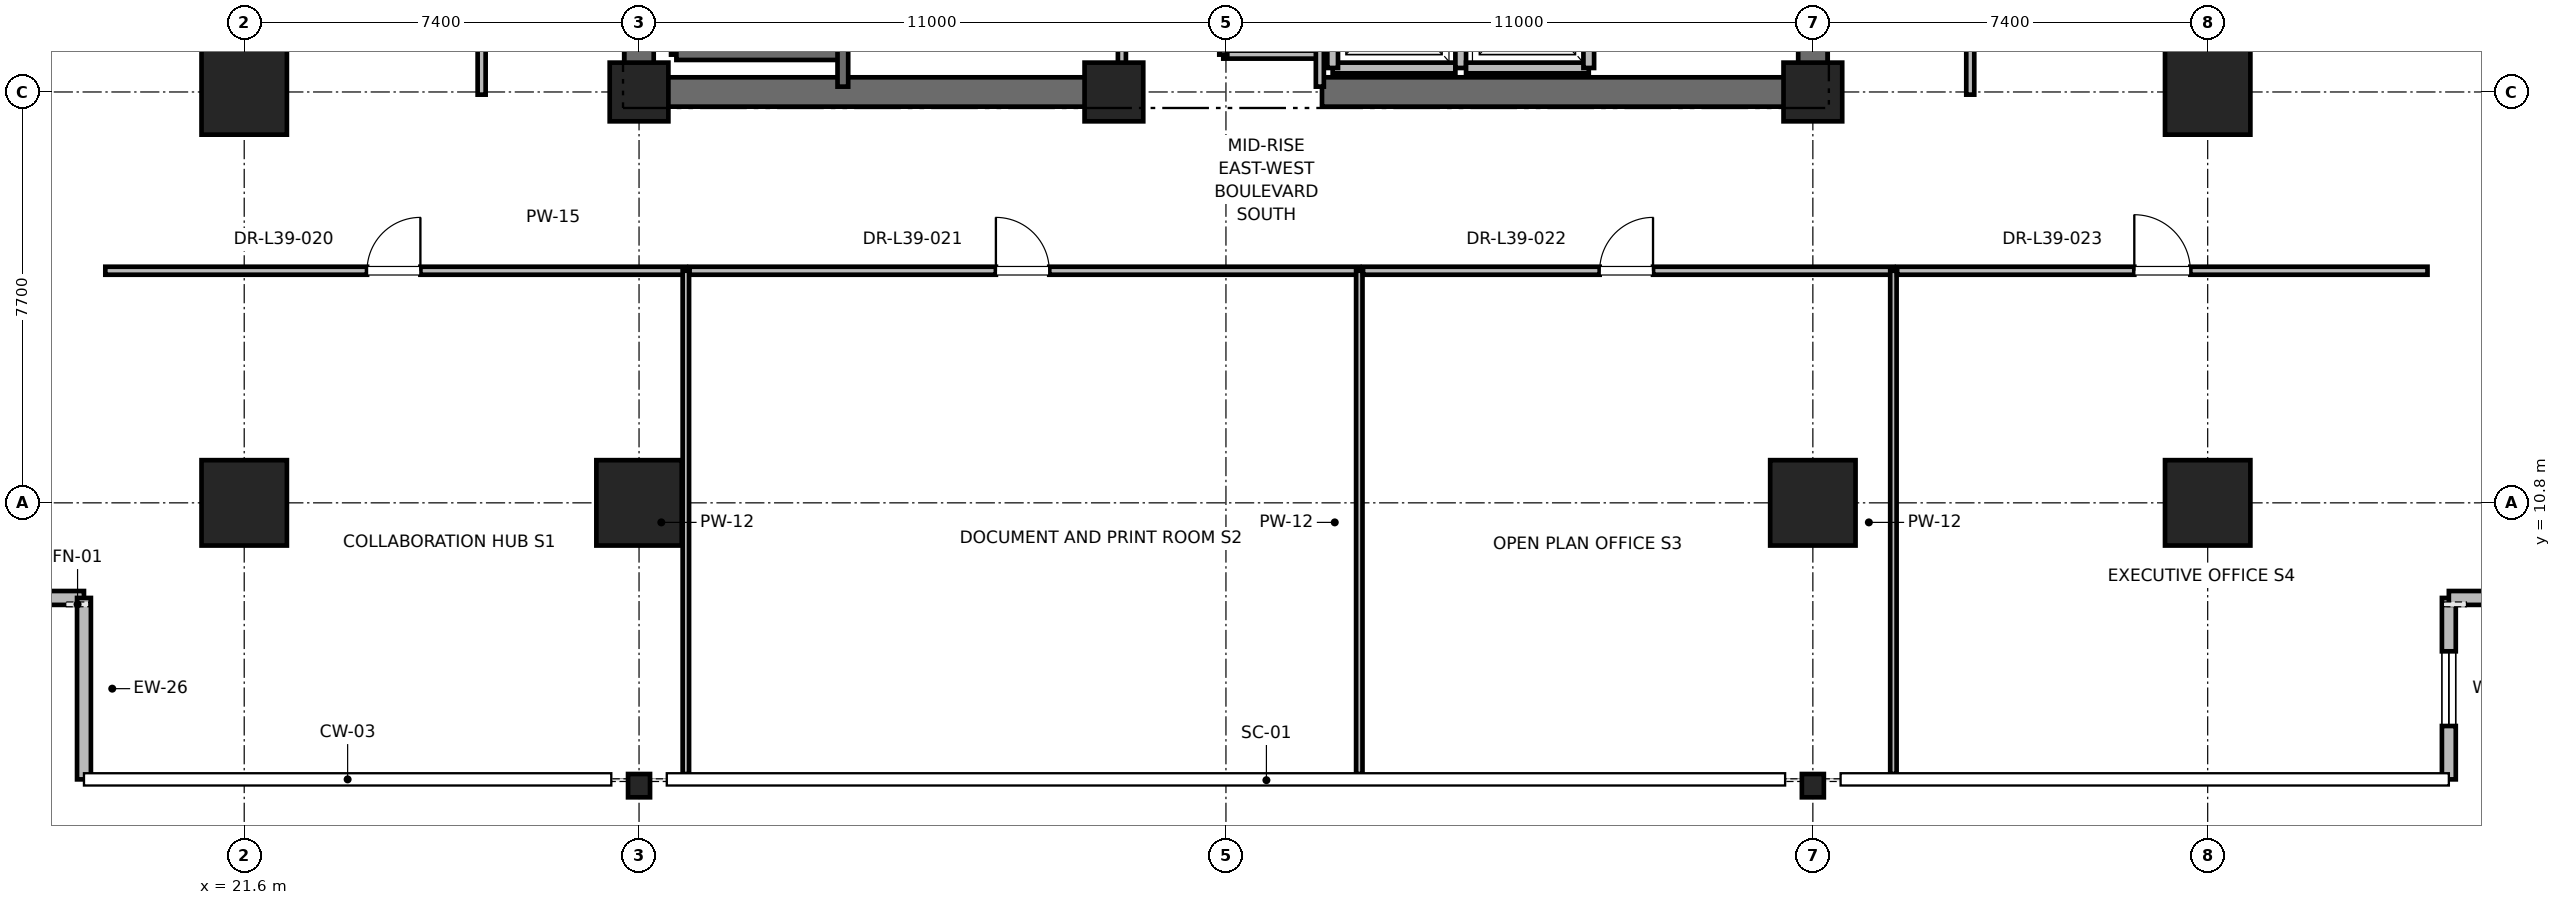
"""IFC4 building model, lengths in metres.
Left out: names, types, materials, properties, quantities, classifications, styles, units other than length and angle.
Written with IfcOpenShell. Run it as: python <this file> out.ifc"""

import sys

from ifc_helpers import new_model, si_unit, direction, frame, frame_2d, origin, origin_2d, place, context, subcontext, project, spatial, rectangle, i_section, extrude, element, fill, save


model = new_model("IFC4")
c1 = context("Model", 3, precision=1e-05, world=origin(), true_north=direction((0.0, 1.0)))
c2 = subcontext(c1, "Body", "Model", "MODEL_VIEW")
j1 = project(units=[si_unit("LENGTHUNIT", "METRE"), si_unit("PLANEANGLEUNIT", "RADIAN")], contexts=[c1])
p1 = place(None, origin())
s1 = spatial("IfcSite", under=j1, at=p1, CompositionType="ELEMENT")
p2 = place(p1, origin())
s2 = spatial("IfcBuilding", under=s1, at=p2, CompositionType="ELEMENT")
p3 = place(p2, frame((0.0, 0.0, 168.4)))
s3 = spatial("IfcBuildingStorey", under=s2, at=p3, CompositionType="ELEMENT", Elevation=168.4)
for number, where, z_axis, x_axis in (
    (1, (29.0, 10.8, 0.0), (0.0, 0.0, 1.0), (1.0, 0.0, 0.0)),
    (2, (51.0, 10.8, 0.0), (0.0, 0.0, 1.0), (1.0, 0.0, 0.0)),
    (3, (21.6, 18.5, 0.0), (0.0, 0.0, 1.0), (1.0, 0.0, 0.0)),
    (4, (58.4, 18.5, 0.0), (0.0, 0.0, 1.0), (1.0, 0.0, 0.0)),
    (5, (21.6, 10.8, 0.0), (0.0, 0.0, 1.0), (1.0, 0.0, 0.0)),
    (6, (58.4, 10.8, 0.0), (0.0, 0.0, 1.0), (1.0, 0.0, 0.0)),
):
    element("IfcColumn", number, at=place(p3, frame(where, z_axis=z_axis, x_axis=x_axis)), inside=s3, PredefinedType="COLUMN", context=c2, shape_type="SweptSolid", body=[
        extrude(rectangle(XDim=1.6, YDim=1.6, at=origin_2d()), origin(), (0.0, 0.0, 1.0), 4.0),
    ])
for number, where, z_axis, x_axis in (
    (7, (29.0, 5.5, 0.0), (0.0, 0.0, 1.0), (1.0, 0.0, 0.0)),
    (8, (51.0, 5.5, 0.0), (0.0, 0.0, 1.0), (1.0, 0.0, 0.0)),
):
    element("IfcColumn", number, at=place(p3, frame(where, z_axis=z_axis, x_axis=x_axis)), inside=s3, PredefinedType="COLUMN", context=c2, shape_type="SweptSolid", body=[
        extrude(i_section(OverallWidth=0.412, OverallDepth=0.437, WebThickness=0.036, FlangeThickness=0.058, FilletRadius=0.015, at=origin_2d()), origin(), (0.0, 0.0, 1.0), 4.0),
    ])
for number, where, z_axis, x_axis in (
    (9, (29.0, 18.5, 0.0), (0.0, 0.0, 1.0), (1.0, 0.0, 0.0)),
    (10, (51.0, 18.5, 0.0), (0.0, 0.0, 1.0), (1.0, 0.0, 0.0)),
    (11, (37.9, 18.5, 0.0), (0.0, 0.0, 1.0), (1.0, 0.0, 0.0)),
):
    element("IfcColumn", number, at=place(p3, frame(where, z_axis=z_axis, x_axis=x_axis)), inside=s3, PredefinedType="PILASTER", context=c2, shape_type="SweptSolid", body=[
        extrude(rectangle(XDim=1.1, YDim=1.1, at=origin_2d()), origin(), (0.0, 0.0, 1.0), 4.0),
    ])
for number, where, z_axis, x_axis in (
    (12, (29.0, 18.5, 0.0), (0.0, 0.0, 1.0), (1.0, 0.0, 0.0)),
    (13, (41.8, 18.5, 0.0), (0.0, 0.0, 1.0), (1.0, 0.0, 0.0)),
):
    element("IfcWall", number, at=place(p3, frame(where, z_axis=z_axis, x_axis=x_axis)), inside=s3, PredefinedType="SHEAR", context=c2, shape_type="SweptSolid", body=[
        extrude(rectangle(XDim=9.2, YDim=0.55, at=frame_2d((4.6, 0.0))), origin(), (0.0, 0.0, 1.0), 3.775),
    ])
p4 = place(p3, frame((29.0, 18.5, 0.0), z_axis=(0.0, 0.0, 1.0), x_axis=(0.0, 1.0, 0.0)))
e14 = element("IfcWall", 14, at=p4, inside=s3, PredefinedType="SHEAR", context=c2, shape_type="SweptSolid", body=[
    extrude(rectangle(XDim=8.8, YDim=0.55, at=frame_2d((4.4, 0.0))), origin(), (0.0, 0.0, 1.0), 3.775),
])
p5 = place(p3, frame((51.0, 18.5, 0.0), z_axis=(0.0, 0.0, 1.0), x_axis=(0.0, 1.0, 0.0)))
e15 = element("IfcWall", 15, at=p5, inside=s3, PredefinedType="SHEAR", context=c2, shape_type="SweptSolid", body=[
    extrude(rectangle(XDim=5.8, YDim=0.55, at=frame_2d((2.9, 0.0))), origin(), (0.0, 0.0, 1.0), 3.775),
])
p6 = place(p3, frame((14.797, 9.018, 0.0), z_axis=(0.0, 0.0, 1.0), x_axis=(1.0, 0.0, 0.0)))
e16 = element("IfcWall", 16, at=p6, inside=s3, PredefinedType="PARAPET", context=c2, shape_type="SweptSolid", body=[
    extrude(rectangle(XDim=3.8, YDim=0.26, at=frame_2d((1.9, 0.0))), origin(), (0.0, 0.0, 1.0), 3.775),
])
p7 = place(p6, frame((1.2, 0.0, 0.85)))
e17 = element("IfcOpeningElement", 17, at=p7, cuts=e16, PredefinedType="OPENING", context=c2, shape_type="SweptSolid", body=[
    extrude(rectangle(XDim=1.4, YDim=2.0, at=frame_2d((0.7, 1.0))), frame((0.0, 0.13, 0.0), z_axis=(0.0, -1.0, 0.0), x_axis=(1.0, 0.0, 0.0)), (0.0, 0.0, 1.0), 0.26),
])
p8 = place(p3, frame((18.597, 9.018, 0.0), z_axis=(0.0, 0.0, 1.0), x_axis=(0.0, -1.0, 0.0)))
e18 = element("IfcWall", 18, at=p8, inside=s3, PredefinedType="PARAPET", context=c2, shape_type="SweptSolid", body=[
    extrude(rectangle(XDim=3.4, YDim=0.26, at=frame_2d((1.7, 0.0))), origin(), (0.0, 0.0, 1.0), 3.775),
])
p9 = place(p3, frame((62.92, 5.618, 0.0), z_axis=(0.0, 0.0, 1.0), x_axis=(0.0, 1.0, 0.0)))
e19 = element("IfcWall", 19, at=p9, inside=s3, PredefinedType="PARAPET", context=c2, shape_type="SweptSolid", body=[
    extrude(rectangle(XDim=3.4, YDim=0.26, at=frame_2d((1.7, 0.0))), origin(), (0.0, 0.0, 1.0), 3.775),
])
p10 = place(p9, frame((1.0, 0.0, 0.85)))
e20 = element("IfcOpeningElement", 20, at=p10, cuts=e19, PredefinedType="OPENING", context=c2, shape_type="SweptSolid", body=[
    extrude(rectangle(XDim=1.4, YDim=2.0, at=frame_2d((0.7, 1.0))), frame((0.0, 0.13, 0.0), z_axis=(0.0, -1.0, 0.0), x_axis=(1.0, 0.0, 0.0)), (0.0, 0.0, 1.0), 0.26),
])
p11 = place(p3, frame((62.92, 9.018, 0.0), z_axis=(0.0, 0.0, 1.0), x_axis=(1.0, 0.0, 0.0)))
e21 = element("IfcWall", 21, at=p11, inside=s3, PredefinedType="PARAPET", context=c2, shape_type="SweptSolid", body=[
    extrude(rectangle(XDim=3.8, YDim=0.26, at=frame_2d((1.9, 0.0))), origin(), (0.0, 0.0, 1.0), 3.775),
])
p12 = place(p3, frame((29.7, 19.2, 0.0), z_axis=(0.0, 0.0, 1.0), x_axis=(0.0, 1.0, 0.0)))
e22 = element("IfcWall", 22, at=p12, inside=s3, PredefinedType="SOLIDWALL", context=c2, shape_type="SweptSolid", body=[
    extrude(rectangle(XDim=8.15, YDim=0.2, at=frame_2d((4.075, 0.0))), origin(), (0.0, 0.0, 1.0), 3.775),
])
p13 = place(p3, frame((29.7, 19.2, 0.0), z_axis=(0.0, 0.0, 1.0), x_axis=(1.0, 0.0, 0.0)))
e23 = element("IfcWall", 23, at=p13, inside=s3, PredefinedType="SOLIDWALL", context=c2, shape_type="SweptSolid", body=[
    extrude(rectangle(XDim=3.12, YDim=0.2, at=frame_2d((1.56, 0.0))), origin(), (0.0, 0.0, 1.0), 3.775),
])
p14 = place(p3, frame((32.82, 18.6, 0.0), z_axis=(0.0, 0.0, 1.0), x_axis=(0.0, 1.0, 0.0)))
e24 = element("IfcWall", 24, at=p14, inside=s3, PredefinedType="SOLIDWALL", context=c2, shape_type="SweptSolid", body=[
    extrude(rectangle(XDim=8.78, YDim=0.2, at=frame_2d((4.39, 0.0))), origin(), (0.0, 0.0, 1.0), 3.775),
])
p15 = place(p3, frame((42.0, 18.95, 0.0), z_axis=(0.0, 0.0, 1.0), x_axis=(1.0, 0.0, 0.0)))
e25 = element("IfcWall", 25, at=p15, inside=s3, PredefinedType="SOLIDWALL", context=c2, shape_type="SweptSolid", body=[
    extrude(rectangle(XDim=2.3, YDim=0.2, at=frame_2d((1.15, 0.0))), origin(), (0.0, 0.0, 1.0), 2.755),
])
p16 = place(p3, frame((42.0, 21.55, 0.0), z_axis=(0.0, 0.0, 1.0), x_axis=(0.0, -1.0, 0.0)))
e26 = element("IfcWall", 26, at=p16, inside=s3, PredefinedType="SOLIDWALL", context=c2, shape_type="SweptSolid", body=[
    extrude(rectangle(XDim=2.6, YDim=0.2, at=frame_2d((1.3, 0.0))), origin(), (0.0, 0.0, 1.0), 2.755),
])
p17 = place(p3, frame((44.4, 18.95, 0.0), z_axis=(0.0, 0.0, 1.0), x_axis=(0.0, 1.0, 0.0)))
e27 = element("IfcWall", 27, at=p17, inside=s3, PredefinedType="SOLIDWALL", context=c2, shape_type="SweptSolid", body=[
    extrude(rectangle(XDim=2.6, YDim=0.2, at=frame_2d((1.3, 0.0))), origin(), (0.0, 0.0, 1.0), 3.775),
])
p18 = place(p3, frame((44.5, 18.95, 0.0), z_axis=(0.0, 0.0, 1.0), x_axis=(1.0, 0.0, 0.0)))
e28 = element("IfcWall", 28, at=p18, inside=s3, PredefinedType="SOLIDWALL", context=c2, shape_type="SweptSolid", body=[
    extrude(rectangle(XDim=2.3, YDim=0.2, at=frame_2d((1.15, 0.0))), origin(), (0.0, 0.0, 1.0), 3.775),
])
p19 = place(p3, frame((46.8, 18.95, 0.0), z_axis=(0.0, 0.0, 1.0), x_axis=(0.0, 1.0, 0.0)))
e29 = element("IfcWall", 29, at=p19, inside=s3, PredefinedType="SOLIDWALL", context=c2, shape_type="SweptSolid", body=[
    extrude(rectangle(XDim=2.6, YDim=0.2, at=frame_2d((1.3, 0.0))), origin(), (0.0, 0.0, 1.0), 3.775),
])
p20 = place(p3, frame((39.95, 19.2, 0.0), z_axis=(0.0, 0.0, 1.0), x_axis=(1.0, 0.0, 0.0)))
e30 = element("IfcWall", 30, at=p20, inside=s3, PredefinedType="PARTITIONING", context=c2, shape_type="SweptSolid", body=[
    extrude(rectangle(XDim=1.81, YDim=0.15, at=frame_2d((0.905, 0.0))), origin(), (0.0, 0.0, 1.0), 2.85),
])
p21 = place(p3, frame((41.76, 18.6, 0.0), z_axis=(0.0, 0.0, 1.0), x_axis=(0.0, 1.0, 0.0)))
e31 = element("IfcWall", 31, at=p21, inside=s3, PredefinedType="PARTITIONING", context=c2, shape_type="SweptSolid", body=[
    extrude(rectangle(XDim=3.6, YDim=0.15, at=frame_2d((1.8, 0.0))), origin(), (0.0, 0.0, 1.0), 2.755),
])
p22 = place(p3, frame((39.95, 19.2, 0.0), z_axis=(0.0, 0.0, 1.0), x_axis=(0.0, 1.0, 0.0)))
e32 = element("IfcWall", 32, at=p22, inside=s3, PredefinedType="PARTITIONING", context=c2, shape_type="SweptSolid", body=[
    extrude(rectangle(XDim=3.0, YDim=0.15, at=frame_2d((1.5, 0.0))), origin(), (0.0, 0.0, 1.0), 2.85),
])
p23 = place(p22, frame((1.05, 0.0, 0.0)))
e33 = element("IfcOpeningElement", 33, at=p23, cuts=e32, PredefinedType="OPENING", context=c2, shape_type="SweptSolid", body=[
    extrude(rectangle(XDim=0.9, YDim=2.1, at=frame_2d((0.45, 1.05))), frame((0.0, 0.075, 0.0), z_axis=(0.0, -1.0, 0.0), x_axis=(1.0, 0.0, 0.0)), (0.0, 0.0, 1.0), 0.15),
])
p24 = place(p3, frame((38.05, 18.6, 0.0), z_axis=(0.0, 0.0, 1.0), x_axis=(0.0, 1.0, 0.0)))
e34 = element("IfcWall", 34, at=p24, inside=s3, PredefinedType="PARTITIONING", context=c2, shape_type="SweptSolid", body=[
    extrude(rectangle(XDim=4.46, YDim=0.15, at=frame_2d((2.23, 0.0))), origin(), (0.0, 0.0, 1.0), 2.755),
])
p25 = place(p24, frame((1.73, 0.0, 0.0)))
e35 = element("IfcOpeningElement", 35, at=p25, cuts=e34, PredefinedType="OPENING", context=c2, shape_type="SweptSolid", body=[
    extrude(rectangle(XDim=1.0, YDim=2.15, at=frame_2d((0.5, 1.075))), frame((0.0, 0.075, 0.0), z_axis=(0.0, -1.0, 0.0), x_axis=(1.0, 0.0, 0.0)), (0.0, 0.0, 1.0), 0.15),
])
p26 = place(p3, frame((18.997, 15.15, 0.0), z_axis=(0.0, 0.0, 1.0), x_axis=(1.0, 0.0, 0.0)))
e36 = element("IfcWall", 36, at=p26, inside=s3, PredefinedType="PARTITIONING", context=c2, shape_type="SweptSolid", body=[
    extrude(rectangle(XDim=10.881, YDim=0.15, at=frame_2d((5.44, 0.0))), origin(), (0.0, 0.0, 1.0), 2.85),
])
p27 = place(p26, frame((4.905, 0.0, 0.0)))
e37 = element("IfcOpeningElement", 37, at=p27, cuts=e36, PredefinedType="OPENING", context=c2, shape_type="SweptSolid", body=[
    extrude(rectangle(XDim=1.0, YDim=2.15, at=frame_2d((0.5, 1.075))), frame((0.0, 0.075, 0.0), z_axis=(0.0, -1.0, 0.0), x_axis=(1.0, 0.0, 0.0)), (0.0, 0.0, 1.0), 0.15),
])
p28 = place(p3, frame((29.877, 5.718, 0.0), z_axis=(0.0, 0.0, 1.0), x_axis=(0.0, 1.0, 0.0)))
e38 = element("IfcWall", 38, at=p28, inside=s3, PredefinedType="PARTITIONING", context=c2, shape_type="SweptSolid", body=[
    extrude(rectangle(XDim=9.432, YDim=0.12, at=frame_2d((4.716, 0.0))), origin(), (0.0, 0.0, 1.0), 2.405),
])
p29 = place(p3, frame((29.948, 15.15, 0.0), z_axis=(0.0, 0.0, 1.0), x_axis=(1.0, 0.0, 0.0)))
e39 = element("IfcWall", 39, at=p29, inside=s3, PredefinedType="PARTITIONING", context=c2, shape_type="SweptSolid", body=[
    extrude(rectangle(XDim=12.552, YDim=0.15, at=frame_2d((6.276, 0.0))), origin(), (0.0, 0.0, 1.0), 2.85),
])
p30 = place(p29, frame((5.741, 0.0, 0.0)))
e40 = element("IfcOpeningElement", 40, at=p30, cuts=e39, PredefinedType="OPENING", context=c2, shape_type="SweptSolid", body=[
    extrude(rectangle(XDim=1.0, YDim=2.15, at=frame_2d((0.5, 1.075))), frame((0.0, 0.075, 0.0), z_axis=(0.0, -1.0, 0.0), x_axis=(1.0, 0.0, 0.0)), (0.0, 0.0, 1.0), 0.15),
])
p31 = place(p3, frame((42.499, 5.718, 0.0), z_axis=(0.0, 0.0, 1.0), x_axis=(0.0, 1.0, 0.0)))
e41 = element("IfcWall", 41, at=p31, inside=s3, PredefinedType="PARTITIONING", context=c2, shape_type="SweptSolid", body=[
    extrude(rectangle(XDim=9.432, YDim=0.12, at=frame_2d((4.716, 0.0))), origin(), (0.0, 0.0, 1.0), 2.405),
])
p32 = place(p3, frame((42.569, 15.15, 0.0), z_axis=(0.0, 0.0, 1.0), x_axis=(1.0, 0.0, 0.0)))
e42 = element("IfcWall", 42, at=p32, inside=s3, PredefinedType="PARTITIONING", context=c2, shape_type="SweptSolid", body=[
    extrude(rectangle(XDim=9.94, YDim=0.15, at=frame_2d((4.97, 0.0))), origin(), (0.0, 0.0, 1.0), 2.85),
])
p33 = place(p32, frame((4.435, 0.0, 0.0)))
e43 = element("IfcOpeningElement", 43, at=p33, cuts=e42, PredefinedType="OPENING", context=c2, shape_type="SweptSolid", body=[
    extrude(rectangle(XDim=1.0, YDim=2.15, at=frame_2d((0.5, 1.075))), frame((0.0, 0.075, 0.0), z_axis=(0.0, -1.0, 0.0), x_axis=(1.0, 0.0, 0.0)), (0.0, 0.0, 1.0), 0.15),
])
p34 = place(p3, frame((52.51, 5.718, 0.0), z_axis=(0.0, 0.0, 1.0), x_axis=(0.0, 1.0, 0.0)))
e44 = element("IfcWall", 44, at=p34, inside=s3, PredefinedType="PARTITIONING", context=c2, shape_type="SweptSolid", body=[
    extrude(rectangle(XDim=9.432, YDim=0.12, at=frame_2d((4.716, 0.0))), origin(), (0.0, 0.0, 1.0), 2.85),
])
p35 = place(p3, frame((52.58, 15.15, 0.0), z_axis=(0.0, 0.0, 1.0), x_axis=(1.0, 0.0, 0.0)))
e45 = element("IfcWall", 45, at=p35, inside=s3, PredefinedType="PARTITIONING", context=c2, shape_type="SweptSolid", body=[
    extrude(rectangle(XDim=9.94, YDim=0.15, at=frame_2d((4.97, 0.0))), origin(), (0.0, 0.0, 1.0), 2.85),
])
p36 = place(p35, frame((4.445, 0.0, 0.0)))
e46 = element("IfcOpeningElement", 46, at=p36, cuts=e45, PredefinedType="OPENING", context=c2, shape_type="SweptSolid", body=[
    extrude(rectangle(XDim=1.05, YDim=2.2, at=frame_2d((0.525, 1.1))), frame((0.0, 0.075, 0.0), z_axis=(0.0, -1.0, 0.0), x_axis=(1.0, 0.0, 0.0)), (0.0, 0.0, 1.0), 0.15),
])
p37 = place(p3, frame((26.05, 18.45, 0.0), z_axis=(0.0, 0.0, 1.0), x_axis=(0.0, 1.0, 0.0)))
e47 = element("IfcWall", 47, at=p37, inside=s3, PredefinedType="PARTITIONING", context=c2, shape_type="SweptSolid", body=[
    extrude(rectangle(XDim=6.335, YDim=0.15, at=frame_2d((3.167, 0.0))), origin(), (0.0, 0.0, 1.0), 2.85),
])
p38 = place(p37, frame((2.458, 0.0, 0.0)))
e48 = element("IfcOpeningElement", 48, at=p38, cuts=e47, PredefinedType="OPENING", context=c2, shape_type="SweptSolid", body=[
    extrude(rectangle(XDim=1.5, YDim=2.25, at=frame_2d((0.75, 1.125))), frame((0.0, 0.075, 0.0), z_axis=(0.0, -1.0, 0.0), x_axis=(1.0, 0.0, 0.0)), (0.0, 0.0, 1.0), 0.15),
])
p39 = place(p3, frame((53.95, 18.45, 0.0), z_axis=(0.0, 0.0, 1.0), x_axis=(0.0, 1.0, 0.0)))
e49 = element("IfcWall", 49, at=p39, inside=s3, PredefinedType="PARTITIONING", context=c2, shape_type="SweptSolid", body=[
    extrude(rectangle(XDim=7.602, YDim=0.15, at=frame_2d((3.801, 0.0))), origin(), (0.0, 0.0, 1.0), 2.85),
])
p40 = place(p39, frame((3.341, 0.0, 0.0)))
e50 = element("IfcOpeningElement", 50, at=p40, cuts=e49, PredefinedType="OPENING", context=c2, shape_type="SweptSolid", body=[
    extrude(rectangle(XDim=1.0, YDim=2.15, at=frame_2d((0.5, 1.075))), frame((0.0, 0.075, 0.0), z_axis=(0.0, -1.0, 0.0), x_axis=(1.0, 0.0, 0.0)), (0.0, 0.0, 1.0), 0.15),
])
p41 = place(p10, origin())
e51 = element("IfcWindow", 51, at=p41, inside=s3, PartitioningType="SINGLE_PANEL", PredefinedType="WINDOW", context=c2, shape_type="SweptSolid", body=[
    extrude(rectangle(XDim=1.4, YDim=2.0, at=frame_2d((0.7, 1.0))), frame((0.0, 0.03, 0.0), z_axis=(0.0, -1.0, 0.0), x_axis=(1.0, 0.0, 0.0)), (0.0, 0.0, 1.0), 0.06),
])
fill(e20, e51)
p42 = place(p27, origin())
e52 = element("IfcDoor", 52, at=p42, inside=s3, OperationType="SINGLE_SWING_RIGHT", PredefinedType="DOOR", context=c2, shape_type="SweptSolid", body=[
    extrude(rectangle(XDim=1.0, YDim=2.15, at=frame_2d((0.5, 1.075))), frame((0.0, 0.025, 0.0), z_axis=(0.0, -1.0, 0.0), x_axis=(1.0, 0.0, 0.0)), (0.0, 0.0, 1.0), 0.05),
])
fill(e37, e52)
p43 = place(p30, origin())
e53 = element("IfcDoor", 53, at=p43, inside=s3, OperationType="SINGLE_SWING_LEFT", PredefinedType="DOOR", context=c2, shape_type="SweptSolid", body=[
    extrude(rectangle(XDim=1.0, YDim=2.15, at=frame_2d((0.5, 1.075))), frame((0.0, 0.025, 0.0), z_axis=(0.0, -1.0, 0.0), x_axis=(1.0, 0.0, 0.0)), (0.0, 0.0, 1.0), 0.05),
])
fill(e40, e53)
p44 = place(p33, origin())
e54 = element("IfcDoor", 54, at=p44, inside=s3, OperationType="SINGLE_SWING_RIGHT", PredefinedType="DOOR", context=c2, shape_type="SweptSolid", body=[
    extrude(rectangle(XDim=1.0, YDim=2.15, at=frame_2d((0.5, 1.075))), frame((0.0, 0.025, 0.0), z_axis=(0.0, -1.0, 0.0), x_axis=(1.0, 0.0, 0.0)), (0.0, 0.0, 1.0), 0.05),
])
fill(e43, e54)
p45 = place(p36, origin())
e55 = element("IfcDoor", 55, at=p45, inside=s3, OperationType="SINGLE_SWING_LEFT", PredefinedType="DOOR", context=c2, shape_type="SweptSolid", body=[
    extrude(rectangle(XDim=1.05, YDim=2.2, at=frame_2d((0.525, 1.1))), frame((0.0, 0.025, 0.0), z_axis=(0.0, -1.0, 0.0), x_axis=(1.0, 0.0, 0.0)), (0.0, 0.0, 1.0), 0.05),
])
fill(e46, e55)
save(model, sys.argv[1])
